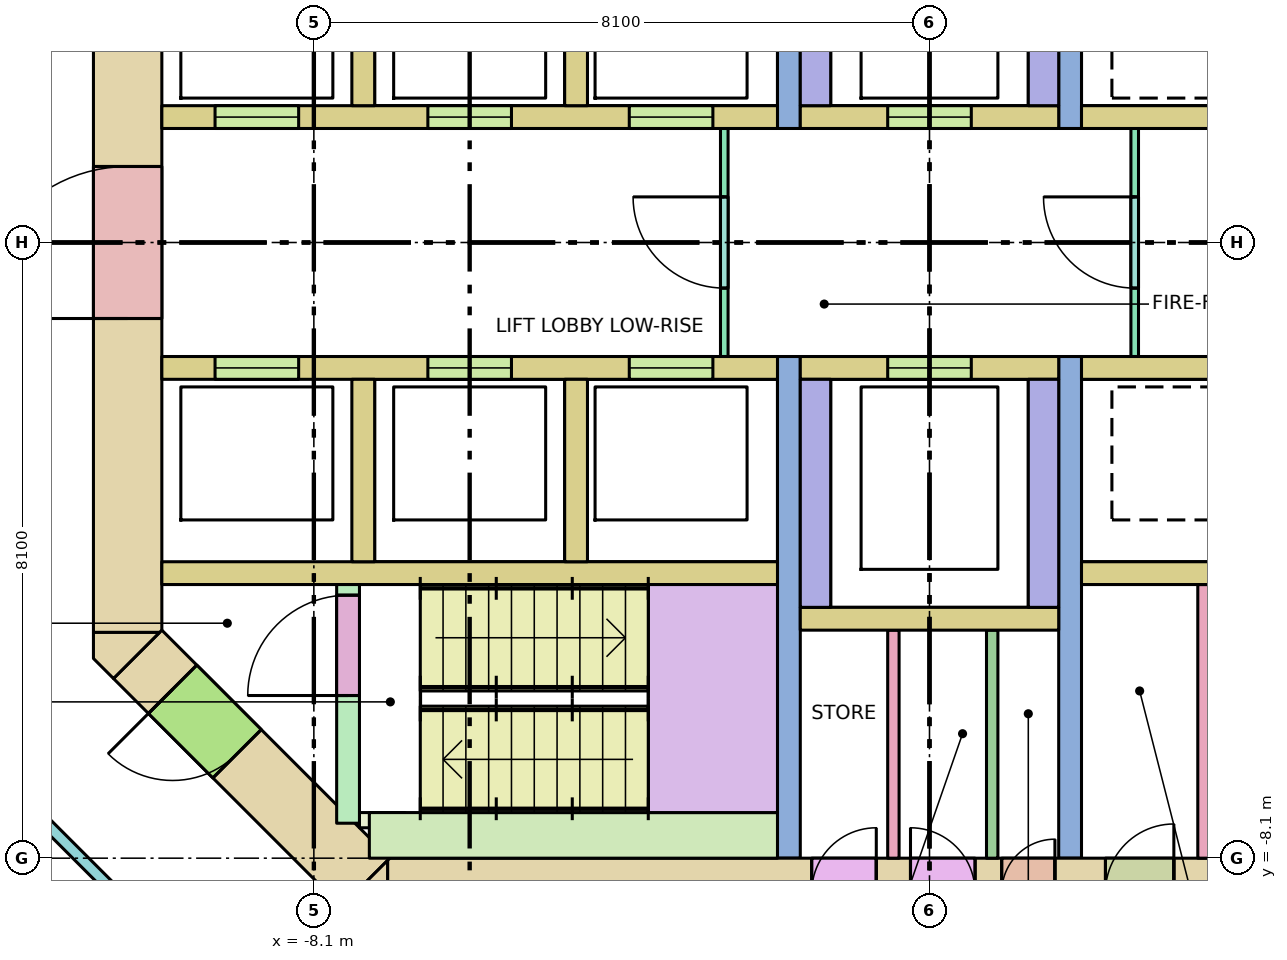
"""IFC4 building model, lengths in metres.
Left out: names, types, materials, properties, quantities, classifications, styles, units other than length and angle.
Written with IfcOpenShell. Run it as: python <this file> out.ifc"""

import sys

from ifc_helpers import new_model, si_unit, direction, frame, frame_2d, origin, place, context, subcontext, project, spatial, polyline, rectangle, outline, extrude, element, fill, save


model = new_model("IFC4")
c1 = context("Model", 3, precision=1e-05, world=origin(), true_north=direction((0.0, 1.0)))
c2 = subcontext(c1, "Body", "Model", "MODEL_VIEW")
j1 = project(units=[si_unit("LENGTHUNIT", "METRE"), si_unit("PLANEANGLEUNIT", "RADIAN")], contexts=[c1])
p1 = place(None, origin())
s1 = spatial("IfcSite", under=j1, at=p1, CompositionType="ELEMENT")
p2 = place(p1, origin())
s2 = spatial("IfcBuilding", under=s1, at=p2, CompositionType="ELEMENT")
p3 = place(p2, frame((0.0, 0.0, 139.0)))
s3 = spatial("IfcBuildingStorey", under=s2, at=p3, CompositionType="ELEMENT", Elevation=139.0)
p4 = place(p3, frame((-7.13, -8.55, -0.28), z_axis=(0.0, 0.0, 1.0), x_axis=(1.0, 0.0, 0.0)))
e1 = element("IfcWall", 1, at=p4, inside=s3, PredefinedType="SHEAR", context=c2, shape_type="SweptSolid", body=[
    extrude(rectangle(XDim=14.26, YDim=0.9, at=frame_2d((7.13, 0.0))), origin(), (0.0, 0.0, 1.0), 3.8),
])
p5 = place(p4, frame((8.08, 0.0, 0.28)))
e2 = element("IfcOpeningElement", 2, at=p5, cuts=e1, PredefinedType="OPENING", context=c2, shape_type="SweptSolid", body=[
    extrude(rectangle(XDim=0.7, YDim=2.1, at=frame_2d((0.35, 1.05))), frame((0.0, 0.46, 0.0), z_axis=(0.0, -1.0, 0.0), x_axis=(1.0, 0.0, 0.0)), (0.0, 0.0, 1.0), 0.92),
])
p6 = place(p4, frame((5.58, 0.0, 0.28)))
e3 = element("IfcOpeningElement", 3, at=p6, cuts=e1, PredefinedType="OPENING", context=c2, shape_type="SweptSolid", body=[
    extrude(rectangle(XDim=0.85, YDim=2.1, at=frame_2d((0.425, 1.05))), frame((0.0, 0.46, 0.0), z_axis=(0.0, -1.0, 0.0), x_axis=(1.0, 0.0, 0.0)), (0.0, 0.0, 1.0), 0.92),
])
p7 = place(p4, frame((6.88, 0.0, 0.28)))
e4 = element("IfcOpeningElement", 4, at=p7, cuts=e1, PredefinedType="OPENING", context=c2, shape_type="SweptSolid", body=[
    extrude(rectangle(XDim=0.85, YDim=2.1, at=frame_2d((0.425, 1.05))), frame((0.0, 0.46, 0.0), z_axis=(0.0, -1.0, 0.0), x_axis=(1.0, 0.0, 0.0)), (0.0, 0.0, 1.0), 0.92),
])
p8 = place(p4, frame((9.445, 0.0, 0.28)))
e5 = element("IfcOpeningElement", 5, at=p8, cuts=e1, PredefinedType="OPENING", context=c2, shape_type="SweptSolid", body=[
    extrude(rectangle(XDim=0.9, YDim=2.1, at=frame_2d((0.45, 1.05))), frame((0.0, 0.46, 0.0), z_axis=(0.0, -1.0, 0.0), x_axis=(1.0, 0.0, 0.0)), (0.0, 0.0, 1.0), 0.92),
])
p9 = place(p4, frame((11.431, 0.0, 0.28)))
e6 = element("IfcOpeningElement", 6, at=p9, cuts=e1, PredefinedType="OPENING", context=c2, shape_type="SweptSolid", body=[
    extrude(rectangle(XDim=0.9, YDim=2.1, at=frame_2d((0.45, 1.05))), frame((0.0, 0.46, 0.0), z_axis=(0.0, -1.0, 0.0), x_axis=(1.0, 0.0, 0.0)), (0.0, 0.0, 1.0), 0.92),
])
p10 = place(p3, frame((-10.55, -5.13, -0.28), z_axis=(0.0, 0.0, 1.0), x_axis=(0.0, 1.0, 0.0)))
e7 = element("IfcWall", 7, at=p10, inside=s3, PredefinedType="SHEAR", context=c2, shape_type="SweptSolid", body=[
    extrude(rectangle(XDim=10.26, YDim=0.9, at=frame_2d((5.13, 0.0))), origin(), (0.0, 0.0, 1.0), 3.8),
])
p11 = place(p10, frame((4.13, 0.0, 0.28)))
e8 = element("IfcOpeningElement", 8, at=p11, cuts=e7, PredefinedType="OPENING", context=c2, shape_type="SweptSolid", body=[
    extrude(rectangle(XDim=2.0, YDim=2.1, at=frame_2d((1.0, 1.05))), frame((0.0, 0.46, 0.0), z_axis=(0.0, -1.0, 0.0), x_axis=(1.0, 0.0, 0.0)), (0.0, 0.0, 1.0), 0.92),
])
p12 = place(p3, frame((-7.418, -8.418, -0.28), z_axis=(0.0, 0.0, 1.0), x_axis=(-0.707106781187, 0.707106781187, 0.0)))
e9 = element("IfcWall", 9, at=p12, inside=s3, PredefinedType="SHEAR", context=c2, shape_type="SweptSolid", body=[
    extrude(rectangle(XDim=4.243, YDim=0.9, at=frame_2d((2.121, 0.0))), origin(), (0.0, 0.0, 1.0), 3.8),
])
p13 = place(p12, frame((2.393, 0.0, 0.28)))
e10 = element("IfcOpeningElement", 10, at=p13, cuts=e9, PredefinedType="OPENING", context=c2, shape_type="SweptSolid", body=[
    extrude(rectangle(XDim=1.2, YDim=2.1, at=frame_2d((0.6, 1.05))), frame((0.0, 0.46, 0.0), z_axis=(0.0, -1.0, 0.0), x_axis=(1.0, 0.0, 0.0)), (0.0, 0.0, 1.0), 0.92),
])
p14 = place(p3, frame((0.0, 0.0, -0.28)))
e11 = element("IfcWall", 11, at=p14, inside=s3, PredefinedType="SHEAR", context=c2, shape_type="SweptSolid", body=[
    extrude(outline(polyline([(-7.473, -9.0), (-7.736, -8.736), (-7.13, -8.13), (-7.13, -9.0), (-7.473, -9.0)])), origin(), (0.0, 0.0, 1.0), 3.8),
])
p15 = place(p3, frame((0.0, 0.0, -0.28)))
e12 = element("IfcWall", 12, at=p15, inside=s3, PredefinedType="SHEAR", context=c2, shape_type="SweptSolid", body=[
    extrude(outline(polyline([(-11.0, -5.473), (-11.0, -5.13), (-10.13, -5.13), (-10.736, -5.736), (-11.0, -5.473)])), origin(), (0.0, 0.0, 1.0), 3.8),
])
for number, where, z_axis, x_axis in (
    (13, (-10.1, -4.35, 0.0), (0.0, 0.0, 1.0), (1.0, 0.0, 0.0)),
    (14, (2.0, -4.35, 0.0), (0.0, 0.0, 1.0), (1.0, 0.0, 0.0)),
):
    element("IfcWall", number, at=place(p3, frame(where, z_axis=z_axis, x_axis=x_axis)), inside=s3, PredefinedType="SOLIDWALL", context=c2, shape_type="SweptSolid", body=[
        extrude(rectangle(XDim=8.1, YDim=0.3, at=frame_2d((4.05, 0.0))), origin(), (0.0, 0.0, 1.0), 3.52),
    ])
p16 = place(p3, frame((-10.1, 1.65, 0.0), z_axis=(0.0, 0.0, 1.0), x_axis=(1.0, 0.0, 0.0)))
e15 = element("IfcWall", 15, at=p16, inside=s3, PredefinedType="SOLIDWALL", context=c2, shape_type="SweptSolid", body=[
    extrude(rectangle(XDim=8.1, YDim=0.3, at=frame_2d((4.05, 0.0))), origin(), (0.0, 0.0, 1.0), 3.52),
])
p17 = place(p16, frame((0.7, 0.0, 0.0)))
e16 = element("IfcOpeningElement", 16, at=p17, cuts=e15, PredefinedType="OPENING", context=c2, shape_type="SweptSolid", body=[
    extrude(rectangle(XDim=1.1, YDim=2.1, at=frame_2d((0.55, 1.05))), frame((0.0, 0.16, 0.0), z_axis=(0.0, -1.0, 0.0), x_axis=(1.0, 0.0, 0.0)), (0.0, 0.0, 1.0), 0.32),
])
p18 = place(p16, frame((3.5, 0.0, 0.0)))
e17 = element("IfcOpeningElement", 17, at=p18, cuts=e15, PredefinedType="OPENING", context=c2, shape_type="SweptSolid", body=[
    extrude(rectangle(XDim=1.1, YDim=2.1, at=frame_2d((0.55, 1.05))), frame((0.0, 0.16, 0.0), z_axis=(0.0, -1.0, 0.0), x_axis=(1.0, 0.0, 0.0)), (0.0, 0.0, 1.0), 0.32),
])
p19 = place(p16, frame((6.15, 0.0, 0.0)))
e18 = element("IfcOpeningElement", 18, at=p19, cuts=e15, PredefinedType="OPENING", context=c2, shape_type="SweptSolid", body=[
    extrude(rectangle(XDim=1.1, YDim=2.1, at=frame_2d((0.55, 1.05))), frame((0.0, 0.16, 0.0), z_axis=(0.0, -1.0, 0.0), x_axis=(1.0, 0.0, 0.0)), (0.0, 0.0, 1.0), 0.32),
])
p20 = place(p3, frame((-10.1, -1.65, 0.0), z_axis=(0.0, 0.0, 1.0), x_axis=(1.0, 0.0, 0.0)))
e19 = element("IfcWall", 19, at=p20, inside=s3, PredefinedType="SOLIDWALL", context=c2, shape_type="SweptSolid", body=[
    extrude(rectangle(XDim=8.1, YDim=0.3, at=frame_2d((4.05, 0.0))), origin(), (0.0, 0.0, 1.0), 3.52),
])
p21 = place(p20, frame((0.7, 0.0, 0.0)))
e20 = element("IfcOpeningElement", 20, at=p21, cuts=e19, PredefinedType="OPENING", context=c2, shape_type="SweptSolid", body=[
    extrude(rectangle(XDim=1.1, YDim=2.1, at=frame_2d((0.55, 1.05))), frame((0.0, 0.16, 0.0), z_axis=(0.0, -1.0, 0.0), x_axis=(1.0, 0.0, 0.0)), (0.0, 0.0, 1.0), 0.32),
])
p22 = place(p20, frame((3.5, 0.0, 0.0)))
e21 = element("IfcOpeningElement", 21, at=p22, cuts=e19, PredefinedType="OPENING", context=c2, shape_type="SweptSolid", body=[
    extrude(rectangle(XDim=1.1, YDim=2.1, at=frame_2d((0.55, 1.05))), frame((0.0, 0.16, 0.0), z_axis=(0.0, -1.0, 0.0), x_axis=(1.0, 0.0, 0.0)), (0.0, 0.0, 1.0), 0.32),
])
p23 = place(p20, frame((6.15, 0.0, 0.0)))
e22 = element("IfcOpeningElement", 22, at=p23, cuts=e19, PredefinedType="OPENING", context=c2, shape_type="SweptSolid", body=[
    extrude(rectangle(XDim=1.1, YDim=2.1, at=frame_2d((0.55, 1.05))), frame((0.0, 0.16, 0.0), z_axis=(0.0, -1.0, 0.0), x_axis=(1.0, 0.0, 0.0)), (0.0, 0.0, 1.0), 0.32),
])
for number, where, z_axis, x_axis in (
    (23, (2.0, 1.65, 0.0), (0.0, 0.0, 1.0), (1.0, 0.0, 0.0)),
    (24, (2.0, -1.65, 0.0), (0.0, 0.0, 1.0), (1.0, 0.0, 0.0)),
):
    element("IfcWall", number, at=place(p3, frame(where, z_axis=z_axis, x_axis=x_axis)), inside=s3, PredefinedType="SOLIDWALL", context=c2, shape_type="SweptSolid", body=[
        extrude(rectangle(XDim=8.1, YDim=0.3, at=frame_2d((4.05, 0.0))), origin(), (0.0, 0.0, 1.0), 3.52),
    ])
for number, where, z_axis, x_axis in (
    (25, (-7.45, 1.8, 0.0), (0.0, 0.0, 1.0), (0.0, 1.0, 0.0)),
    (26, (-7.45, -4.2, 0.0), (0.0, 0.0, 1.0), (0.0, 1.0, 0.0)),
    (27, (-4.65, 1.8, 0.0), (0.0, 0.0, 1.0), (0.0, 1.0, 0.0)),
    (28, (-4.65, -4.2, 0.0), (0.0, 0.0, 1.0), (0.0, 1.0, 0.0)),
):
    element("IfcWall", number, at=place(p3, frame(where, z_axis=z_axis, x_axis=x_axis)), inside=s3, PredefinedType="SOLIDWALL", context=c2, shape_type="SweptSolid", body=[
        extrude(rectangle(XDim=2.4, YDim=0.3, at=frame_2d((1.2, 0.0))), origin(), (0.0, 0.0, 1.0), 3.52),
    ])
for number, where, z_axis, x_axis in (
    (29, (-1.85, 1.5, 0.0), (0.0, 0.0, 1.0), (0.0, 1.0, 0.0)),
    (30, (-1.85, -8.1, 0.0), (0.0, 0.0, 1.0), (0.0, 1.0, 0.0)),
    (31, (1.85, 1.5, 0.0), (0.0, 0.0, 1.0), (0.0, 1.0, 0.0)),
    (32, (1.85, -8.1, 0.0), (0.0, 0.0, 1.0), (0.0, 1.0, 0.0)),
):
    element("IfcWall", number, at=place(p3, frame(where, z_axis=z_axis, x_axis=x_axis)), inside=s3, PredefinedType="SHEAR", context=c2, shape_type="SweptSolid", body=[
        extrude(rectangle(XDim=6.6, YDim=0.3, at=frame_2d((3.3, 0.0))), origin(), (0.0, 0.0, 1.0), 3.52),
    ])
p24 = place(p3, frame((-1.7, 1.65, 0.0), z_axis=(0.0, 0.0, 1.0), x_axis=(1.0, 0.0, 0.0)))
e33 = element("IfcWall", 33, at=p24, inside=s3, PredefinedType="SOLIDWALL", context=c2, shape_type="SweptSolid", body=[
    extrude(rectangle(XDim=3.4, YDim=0.3, at=frame_2d((1.7, 0.0))), origin(), (0.0, 0.0, 1.0), 3.52),
])
p25 = place(p24, frame((1.15, 0.0, 0.0)))
e34 = element("IfcOpeningElement", 34, at=p25, cuts=e33, PredefinedType="OPENING", context=c2, shape_type="SweptSolid", body=[
    extrude(rectangle(XDim=1.1, YDim=2.1, at=frame_2d((0.55, 1.05))), frame((0.0, 0.16, 0.0), z_axis=(0.0, -1.0, 0.0), x_axis=(1.0, 0.0, 0.0)), (0.0, 0.0, 1.0), 0.32),
])
p26 = place(p3, frame((-1.7, -1.65, 0.0), z_axis=(0.0, 0.0, 1.0), x_axis=(1.0, 0.0, 0.0)))
e35 = element("IfcWall", 35, at=p26, inside=s3, PredefinedType="SOLIDWALL", context=c2, shape_type="SweptSolid", body=[
    extrude(rectangle(XDim=3.4, YDim=0.3, at=frame_2d((1.7, 0.0))), origin(), (0.0, 0.0, 1.0), 3.52),
])
p27 = place(p26, frame((1.15, 0.0, 0.0)))
e36 = element("IfcOpeningElement", 36, at=p27, cuts=e35, PredefinedType="OPENING", context=c2, shape_type="SweptSolid", body=[
    extrude(rectangle(XDim=1.1, YDim=2.1, at=frame_2d((0.55, 1.05))), frame((0.0, 0.16, 0.0), z_axis=(0.0, -1.0, 0.0), x_axis=(1.0, 0.0, 0.0)), (0.0, 0.0, 1.0), 0.32),
])
for number, where, z_axis, x_axis in (
    (37, (-1.5, 1.8, 0.0), (0.0, 0.0, 1.0), (0.0, 1.0, 0.0)),
    (38, (-1.5, -4.8, 0.0), (0.0, 0.0, 1.0), (0.0, 1.0, 0.0)),
    (39, (1.5, 1.8, 0.0), (0.0, 0.0, 1.0), (0.0, 1.0, 0.0)),
    (40, (1.5, -4.8, 0.0), (0.0, 0.0, 1.0), (0.0, 1.0, 0.0)),
):
    element("IfcWall", number, at=place(p3, frame(where, z_axis=z_axis, x_axis=x_axis)), inside=s3, PredefinedType="SOLIDWALL", context=c2, shape_type="SweptSolid", body=[
        extrude(rectangle(XDim=3.0, YDim=0.4, at=frame_2d((1.5, 0.0))), origin(), (0.0, 0.0, 1.0), 3.52),
    ])
p28 = place(p3, frame((-1.7, -4.95, 0.0), z_axis=(0.0, 0.0, 1.0), x_axis=(1.0, 0.0, 0.0)))
e41 = element("IfcWall", 41, at=p28, inside=s3, PredefinedType="SOLIDWALL", context=c2, shape_type="SweptSolid", body=[
    extrude(rectangle(XDim=3.4, YDim=0.3, at=frame_2d((1.7, 0.0))), origin(), (0.0, 0.0, 1.0), 3.52),
])
p29 = place(p3, frame((-7.65, -7.64, 0.0), z_axis=(0.0, 0.0, 1.0), x_axis=(0.0, 1.0, 0.0)))
e42 = element("IfcWall", 42, at=p29, inside=s3, PredefinedType="SHEAR", context=c2, shape_type="SweptSolid", body=[
    extrude(rectangle(XDim=3.14, YDim=0.3, at=frame_2d((1.57, 0.0))), origin(), (0.0, 0.0, 1.0), 3.52),
])
p30 = place(p29, frame((1.68, 0.0, 0.0)))
e43 = element("IfcOpeningElement", 43, at=p30, cuts=e42, PredefinedType="OPENING", context=c2, shape_type="SweptSolid", body=[
    extrude(rectangle(XDim=1.32, YDim=2.1, at=frame_2d((0.66, 1.05))), frame((0.0, 0.16, 0.0), z_axis=(0.0, -1.0, 0.0), x_axis=(1.0, 0.0, 0.0)), (0.0, 0.0, 1.0), 0.32),
])
p31 = place(p3, frame((-7.5, -7.6, 0.0), z_axis=(0.0, 0.0, 1.0), x_axis=(1.0, 0.0, 0.0)))
e44 = element("IfcWall", 44, at=p31, inside=s3, PredefinedType="SHEAR", context=c2, shape_type="SweptSolid", body=[
    extrude(rectangle(XDim=0.6, YDim=0.2, at=frame_2d((0.3, 0.0))), origin(), (0.0, 0.0, 1.0), 3.52),
])
p32 = place(p3, frame((-7.37, -7.8, 0.0), z_axis=(0.0, 0.0, 1.0), x_axis=(1.0, 0.0, 0.0)))
e45 = element("IfcWall", 45, at=p32, inside=s3, PredefinedType="SHEAR", context=c2, shape_type="SweptSolid", body=[
    extrude(rectangle(XDim=5.37, YDim=0.6, at=frame_2d((2.685, 0.0))), origin(), (0.0, 0.0, 1.0), 3.52),
])
p33 = place(p3, frame((-2.7, -1.5, 0.0), z_axis=(0.0, 0.0, 1.0), x_axis=(0.0, 1.0, 0.0)))
e46 = element("IfcWall", 46, at=p33, inside=s3, PredefinedType="PARTITIONING", context=c2, shape_type="SweptSolid", body=[
    extrude(rectangle(XDim=3.0, YDim=0.1, at=frame_2d((1.5, 0.0))), origin(), (0.0, 0.0, 1.0), 3.52),
])
p34 = place(p33, frame((0.9, 0.0, 0.0)))
e47 = element("IfcOpeningElement", 47, at=p34, cuts=e46, PredefinedType="OPENING", context=c2, shape_type="SweptSolid", body=[
    extrude(rectangle(XDim=1.2, YDim=2.1, at=frame_2d((0.6, 1.05))), frame((0.0, 0.06, 0.0), z_axis=(0.0, -1.0, 0.0), x_axis=(1.0, 0.0, 0.0)), (0.0, 0.0, 1.0), 0.12),
])
p35 = place(p3, frame((2.7, -1.5, 0.0), z_axis=(0.0, 0.0, 1.0), x_axis=(0.0, 1.0, 0.0)))
e48 = element("IfcWall", 48, at=p35, inside=s3, PredefinedType="PARTITIONING", context=c2, shape_type="SweptSolid", body=[
    extrude(rectangle(XDim=3.0, YDim=0.1, at=frame_2d((1.5, 0.0))), origin(), (0.0, 0.0, 1.0), 3.52),
])
p36 = place(p35, frame((0.9, 0.0, 0.0)))
e49 = element("IfcOpeningElement", 49, at=p36, cuts=e48, PredefinedType="OPENING", context=c2, shape_type="SweptSolid", body=[
    extrude(rectangle(XDim=1.2, YDim=2.1, at=frame_2d((0.6, 1.05))), frame((0.0, 0.06, 0.0), z_axis=(0.0, -1.0, 0.0), x_axis=(1.0, 0.0, 0.0)), (0.0, 0.0, 1.0), 0.12),
])
for number, where, z_axis, x_axis in (
    (50, (0.825, -8.1, 0.0), (0.0, 0.0, 1.0), (0.0, 1.0, 0.0)),
    (51, (-0.475, -8.1, 0.0), (0.0, 0.0, 1.0), (0.0, 1.0, 0.0)),
):
    element("IfcWall", number, at=place(p3, frame(where, z_axis=z_axis, x_axis=x_axis)), inside=s3, PredefinedType="PARTITIONING", context=c2, shape_type="SweptSolid", body=[
        extrude(rectangle(XDim=3.0, YDim=0.15, at=frame_2d((1.5, 0.0))), origin(), (0.0, 0.0, 1.0), 3.52),
    ])
p37 = place(p3, frame((3.605, -8.1, 0.0), z_axis=(0.0, 0.0, 1.0), x_axis=(0.0, 1.0, 0.0)))
e52 = element("IfcWall", 52, at=p37, inside=s3, PredefinedType="PARTITIONING", context=c2, shape_type="SweptSolid", body=[
    extrude(rectangle(XDim=3.6, YDim=0.15, at=frame_2d((1.8, 0.0))), origin(), (0.0, 0.0, 1.0), 3.52),
])
p38 = place(p3, frame((-10.534, -8.731, 0.0), z_axis=(0.0, 0.0, 1.0), x_axis=(-0.707106781187, 0.707106781187, 0.0)))
e53 = element("IfcWall", 53, at=p38, inside=s3, PredefinedType="PARTITIONING", context=c2, shape_type="SweptSolid", body=[
    extrude(rectangle(XDim=3.399, YDim=0.15, at=frame_2d((1.7, 0.0))), origin(), (0.0, 0.0, 1.0), 2.67),
])
p39 = place(p17, origin())
e54 = element("IfcDoor", 54, at=p39, inside=s3, OperationType="DOUBLE_DOOR_SLIDING", PredefinedType="DOOR", context=c2, shape_type="SweptSolid", body=[
    extrude(rectangle(XDim=1.1, YDim=2.1, at=frame_2d((0.55, 1.05))), frame((0.0, 0.025, 0.0), z_axis=(0.0, -1.0, 0.0), x_axis=(1.0, 0.0, 0.0)), (0.0, 0.0, 1.0), 0.05),
])
fill(e16, e54)
p40 = place(p18, origin())
e55 = element("IfcDoor", 55, at=p40, inside=s3, OperationType="DOUBLE_DOOR_SLIDING", PredefinedType="DOOR", context=c2, shape_type="SweptSolid", body=[
    extrude(rectangle(XDim=1.1, YDim=2.1, at=frame_2d((0.55, 1.05))), frame((0.0, 0.025, 0.0), z_axis=(0.0, -1.0, 0.0), x_axis=(1.0, 0.0, 0.0)), (0.0, 0.0, 1.0), 0.05),
])
fill(e17, e55)
p41 = place(p19, origin())
e56 = element("IfcDoor", 56, at=p41, inside=s3, OperationType="DOUBLE_DOOR_SLIDING", PredefinedType="DOOR", context=c2, shape_type="SweptSolid", body=[
    extrude(rectangle(XDim=1.1, YDim=2.1, at=frame_2d((0.55, 1.05))), frame((0.0, 0.025, 0.0), z_axis=(0.0, -1.0, 0.0), x_axis=(1.0, 0.0, 0.0)), (0.0, 0.0, 1.0), 0.05),
])
fill(e18, e56)
p42 = place(p21, origin())
e57 = element("IfcDoor", 57, at=p42, inside=s3, OperationType="DOUBLE_DOOR_SLIDING", PredefinedType="DOOR", context=c2, shape_type="SweptSolid", body=[
    extrude(rectangle(XDim=1.1, YDim=2.1, at=frame_2d((0.55, 1.05))), frame((0.0, 0.025, 0.0), z_axis=(0.0, -1.0, 0.0), x_axis=(1.0, 0.0, 0.0)), (0.0, 0.0, 1.0), 0.05),
])
fill(e20, e57)
p43 = place(p22, origin())
e58 = element("IfcDoor", 58, at=p43, inside=s3, OperationType="DOUBLE_DOOR_SLIDING", PredefinedType="DOOR", context=c2, shape_type="SweptSolid", body=[
    extrude(rectangle(XDim=1.1, YDim=2.1, at=frame_2d((0.55, 1.05))), frame((0.0, 0.025, 0.0), z_axis=(0.0, -1.0, 0.0), x_axis=(1.0, 0.0, 0.0)), (0.0, 0.0, 1.0), 0.05),
])
fill(e21, e58)
p44 = place(p23, origin())
e59 = element("IfcDoor", 59, at=p44, inside=s3, OperationType="DOUBLE_DOOR_SLIDING", PredefinedType="DOOR", context=c2, shape_type="SweptSolid", body=[
    extrude(rectangle(XDim=1.1, YDim=2.1, at=frame_2d((0.55, 1.05))), frame((0.0, 0.025, 0.0), z_axis=(0.0, -1.0, 0.0), x_axis=(1.0, 0.0, 0.0)), (0.0, 0.0, 1.0), 0.05),
])
fill(e22, e59)
p45 = place(p25, origin())
e60 = element("IfcDoor", 60, at=p45, inside=s3, OperationType="DOUBLE_DOOR_SLIDING", PredefinedType="DOOR", context=c2, shape_type="SweptSolid", body=[
    extrude(rectangle(XDim=1.1, YDim=2.1, at=frame_2d((0.55, 1.05))), frame((0.0, 0.025, 0.0), z_axis=(0.0, -1.0, 0.0), x_axis=(1.0, 0.0, 0.0)), (0.0, 0.0, 1.0), 0.05),
])
fill(e34, e60)
p46 = place(p27, origin())
e61 = element("IfcDoor", 61, at=p46, inside=s3, OperationType="DOUBLE_DOOR_SLIDING", PredefinedType="DOOR", context=c2, shape_type="SweptSolid", body=[
    extrude(rectangle(XDim=1.1, YDim=2.1, at=frame_2d((0.55, 1.05))), frame((0.0, 0.025, 0.0), z_axis=(0.0, -1.0, 0.0), x_axis=(1.0, 0.0, 0.0)), (0.0, 0.0, 1.0), 0.05),
])
fill(e36, e61)
p47 = place(p30, origin())
e62 = element("IfcDoor", 62, at=p47, inside=s3, OperationType="DOUBLE_DOOR_SINGLE_SWING", PredefinedType="DOOR", context=c2, shape_type="SweptSolid", body=[
    extrude(rectangle(XDim=1.32, YDim=2.1, at=frame_2d((0.66, 1.05))), frame((0.0, 0.025, 0.0), z_axis=(0.0, -1.0, 0.0), x_axis=(1.0, 0.0, 0.0)), (0.0, 0.0, 1.0), 0.05),
])
fill(e43, e62)
p48 = place(p13, origin())
e63 = element("IfcDoor", 63, at=p48, inside=s3, OperationType="SINGLE_SWING_RIGHT", PredefinedType="DOOR", context=c2, shape_type="SweptSolid", body=[
    extrude(rectangle(XDim=1.2, YDim=2.1, at=frame_2d((0.6, 1.05))), frame((0.0, 0.025, 0.0), z_axis=(0.0, -1.0, 0.0), x_axis=(1.0, 0.0, 0.0)), (0.0, 0.0, 1.0), 0.05),
])
fill(e10, e63)
p49 = place(p11, origin())
e64 = element("IfcDoor", 64, at=p49, inside=s3, OperationType="DOUBLE_DOOR_SINGLE_SWING", PredefinedType="DOOR", context=c2, shape_type="SweptSolid", body=[
    extrude(rectangle(XDim=2.0, YDim=2.1, at=frame_2d((1.0, 1.05))), frame((0.0, 0.025, 0.0), z_axis=(0.0, -1.0, 0.0), x_axis=(1.0, 0.0, 0.0)), (0.0, 0.0, 1.0), 0.05),
])
fill(e8, e64)
p50 = place(p34, origin())
e65 = element("IfcDoor", 65, at=p50, inside=s3, OperationType="SINGLE_SWING_RIGHT", PredefinedType="DOOR", context=c2, shape_type="SweptSolid", body=[
    extrude(rectangle(XDim=1.2, YDim=2.1, at=frame_2d((0.6, 1.05))), frame((0.0, 0.025, 0.0), z_axis=(0.0, -1.0, 0.0), x_axis=(1.0, 0.0, 0.0)), (0.0, 0.0, 1.0), 0.05),
])
fill(e47, e65)
p51 = place(p36, origin())
e66 = element("IfcDoor", 66, at=p51, inside=s3, OperationType="SINGLE_SWING_RIGHT", PredefinedType="DOOR", context=c2, shape_type="SweptSolid", body=[
    extrude(rectangle(XDim=1.2, YDim=2.1, at=frame_2d((0.6, 1.05))), frame((0.0, 0.025, 0.0), z_axis=(0.0, -1.0, 0.0), x_axis=(1.0, 0.0, 0.0)), (0.0, 0.0, 1.0), 0.05),
])
fill(e49, e66)
save(model, sys.argv[1])
